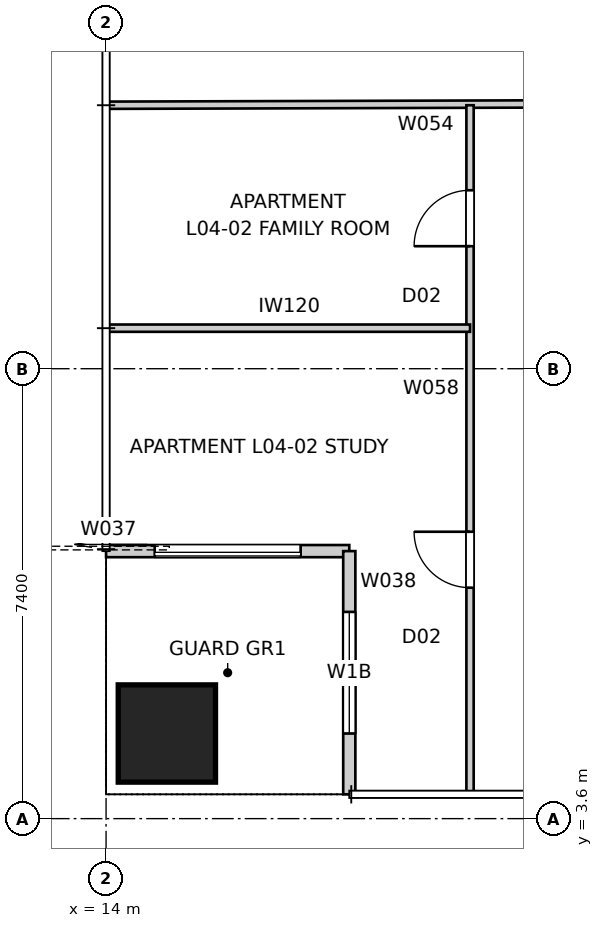
"""IFC4 building model, lengths in metres.
Left out: names, types, materials, properties, quantities, classifications, styles, units other than length and angle.
Written with IfcOpenShell. Run it as: python <this file> out.ifc"""

import sys

from ifc_helpers import new_model, si_unit, direction, frame, frame_2d, origin, origin_2d, place, context, subcontext, project, spatial, rectangle, extrude, element, fill, save


model = new_model("IFC4")
c1 = context("Model", 3, precision=1e-05, world=origin(), true_north=direction((0.0, 1.0)))
c2 = subcontext(c1, "Body", "Model", "MODEL_VIEW")
j1 = project(units=[si_unit("LENGTHUNIT", "METRE"), si_unit("PLANEANGLEUNIT", "RADIAN")], contexts=[c1])
p1 = place(None, origin())
s1 = spatial("IfcSite", under=j1, at=p1, CompositionType="ELEMENT")
p2 = place(p1, origin())
s2 = spatial("IfcBuilding", under=s1, at=p2, CompositionType="ELEMENT")
p3 = place(p2, frame((0.0, 0.0, 18.4)))
s3 = spatial("IfcBuildingStorey", under=s2, at=p3, CompositionType="ELEMENT", Elevation=18.4)
p4 = place(p3, frame((15.0, 5.0, 0.0), z_axis=(0.0, 0.0, 1.0), x_axis=(1.0, 0.0, 0.0)))
e1 = element("IfcColumn", 1, at=p4, inside=s3, PredefinedType="COLUMN", context=c2, shape_type="SweptSolid", body=[
    extrude(rectangle(XDim=1.6, YDim=1.6, at=origin_2d()), origin(), (0.0, 0.0, 1.0), 3.4),
])
p5 = place(p3, frame((14.0, 8.0, 0.0), z_axis=(0.0, 0.0, 1.0), x_axis=(1.0, 0.0, 0.0)))
e2 = element("IfcWall", 2, at=p5, inside=s3, PredefinedType="SOLIDWALL", context=c2, shape_type="SweptSolid", body=[
    extrude(rectangle(XDim=4.0, YDim=0.2, at=frame_2d((2.0, 0.0))), origin(), (0.0, 0.0, 1.0), 3.25),
])
p6 = place(p5, frame((0.8, 0.0, 0.0)))
e3 = element("IfcOpeningElement", 3, at=p6, cuts=e2, PredefinedType="OPENING", context=c2, shape_type="SweptSolid", body=[
    extrude(rectangle(XDim=2.4, YDim=2.1, at=frame_2d((1.2, 1.05))), frame((0.0, 0.11, 0.0), z_axis=(0.0, -1.0, 0.0), x_axis=(1.0, 0.0, 0.0)), (0.0, 0.0, 1.0), 0.22),
])
p7 = place(p3, frame((18.0, 8.0, 0.0), z_axis=(0.0, 0.0, 1.0), x_axis=(0.0, -1.0, 0.0)))
e4 = element("IfcWall", 4, at=p7, inside=s3, PredefinedType="SOLIDWALL", context=c2, shape_type="SweptSolid", body=[
    extrude(rectangle(XDim=4.0, YDim=0.2, at=frame_2d((2.0, 0.0))), origin(), (0.0, 0.0, 1.0), 3.25),
])
p8 = place(p7, frame((1.0, 0.0, 0.45)))
e5 = element("IfcOpeningElement", 5, at=p8, cuts=e4, PredefinedType="OPENING", context=c2, shape_type="SweptSolid", body=[
    extrude(rectangle(XDim=2.0, YDim=1.8, at=frame_2d((1.0, 0.9))), frame((0.0, 0.11, 0.0), z_axis=(0.0, -1.0, 0.0), x_axis=(1.0, 0.0, 0.0)), (0.0, 0.0, 1.0), 0.22),
])
p9 = place(p3, frame((29.0, 15.378, 0.0), z_axis=(0.0, 0.0, 1.0), x_axis=(-0.999995589081, -0.002970154664, 0.0)))
e6 = element("IfcWall", 6, at=p9, inside=s3, PredefinedType="PARTITIONING", context=c2, shape_type="SweptSolid", body=[
    extrude(rectangle(XDim=14.96, YDim=0.12, at=frame_2d((7.48, 0.0))), origin(), (0.0, 0.0, 1.0), 2.638),
])
p10 = place(p9, frame((3.57, 0.0, 0.0)))
e7 = element("IfcOpeningElement", 7, at=p10, cuts=e6, PredefinedType="OPENING", context=c2, shape_type="SweptSolid", body=[
    extrude(rectangle(XDim=0.96, YDim=2.1, at=frame_2d((0.48, 1.05))), frame((0.0, 0.07, 0.0), z_axis=(0.0, -1.0, 0.0), x_axis=(1.0, 0.0, 0.0)), (0.0, 0.0, 1.0), 0.14),
])
p11 = place(p3, frame((19.986, 4.04, 0.0), z_axis=(0.0, 0.0, 1.0), x_axis=(0.0, 1.0, 0.0)))
e8 = element("IfcWall", 8, at=p11, inside=s3, PredefinedType="PARTITIONING", context=c2, shape_type="SweptSolid", body=[
    extrude(rectangle(XDim=11.293, YDim=0.12, at=frame_2d((5.646, 0.0))), origin(), (0.0, 0.0, 1.0), 3.25),
])
p12 = place(p11, frame((3.358, 0.0, 0.0)))
e9 = element("IfcOpeningElement", 9, at=p12, cuts=e8, PredefinedType="OPENING", context=c2, shape_type="SweptSolid", body=[
    extrude(rectangle(XDim=0.92, YDim=2.34, at=frame_2d((0.46, 1.17))), frame((0.0, 0.07, 0.0), z_axis=(0.0, -1.0, 0.0), x_axis=(1.0, 0.0, 0.0)), (0.0, 0.0, 1.0), 0.14),
])
p13 = place(p11, frame((8.975, 0.0, 0.0)))
e10 = element("IfcOpeningElement", 10, at=p13, cuts=e8, PredefinedType="OPENING", context=c2, shape_type="SweptSolid", body=[
    extrude(rectangle(XDim=0.92, YDim=2.34, at=frame_2d((0.46, 1.17))), frame((0.0, 0.07, 0.0), z_axis=(0.0, -1.0, 0.0), x_axis=(1.0, 0.0, 0.0)), (0.0, 0.0, 1.0), 0.14),
])
p14 = place(p3, frame((14.04, 11.667, 0.0), z_axis=(0.0, 0.0, 1.0), x_axis=(1.0, 0.0, 0.0)))
e11 = element("IfcWall", 11, at=p14, inside=s3, PredefinedType="PARTITIONING", context=c2, shape_type="SweptSolid", body=[
    extrude(rectangle(XDim=5.946, YDim=0.12, at=frame_2d((2.973, 0.0))), origin(), (0.0, 0.0, 1.0), 3.25),
])
p15 = place(p6, origin())
e12 = element("IfcDoor", 12, at=p15, inside=s3, OperationType="SLIDING_TO_LEFT", PredefinedType="DOOR", context=c2, shape_type="SweptSolid", body=[
    extrude(rectangle(XDim=2.4, YDim=2.1, at=frame_2d((1.2, 1.05))), frame((0.0, 0.025, 0.0), z_axis=(0.0, -1.0, 0.0), x_axis=(1.0, 0.0, 0.0)), (0.0, 0.0, 1.0), 0.05),
])
fill(e3, e12)
p16 = place(p8, origin())
e13 = element("IfcWindow", 13, at=p16, inside=s3, PartitioningType="SINGLE_PANEL", PredefinedType="WINDOW", context=c2, shape_type="SweptSolid", body=[
    extrude(rectangle(XDim=2.0, YDim=1.8, at=frame_2d((1.0, 0.9))), frame((0.0, 0.03, 0.0), z_axis=(0.0, -1.0, 0.0), x_axis=(1.0, 0.0, 0.0)), (0.0, 0.0, 1.0), 0.06),
])
fill(e5, e13)
p17 = place(p12, origin())
e14 = element("IfcDoor", 14, at=p17, inside=s3, OperationType="SINGLE_SWING_RIGHT", PredefinedType="DOOR", context=c2, shape_type="SweptSolid", body=[
    extrude(rectangle(XDim=0.92, YDim=2.34, at=frame_2d((0.46, 1.17))), frame((0.0, 0.025, 0.0), z_axis=(0.0, -1.0, 0.0), x_axis=(1.0, 0.0, 0.0)), (0.0, 0.0, 1.0), 0.05),
])
fill(e9, e14)
p18 = place(p13, origin())
e15 = element("IfcDoor", 15, at=p18, inside=s3, OperationType="SINGLE_SWING_LEFT", PredefinedType="DOOR", context=c2, shape_type="SweptSolid", body=[
    extrude(rectangle(XDim=0.92, YDim=2.34, at=frame_2d((0.46, 1.17))), frame((0.0, 0.025, 0.0), z_axis=(0.0, -1.0, 0.0), x_axis=(1.0, 0.0, 0.0)), (0.0, 0.0, 1.0), 0.05),
])
fill(e10, e15)
save(model, sys.argv[1])
